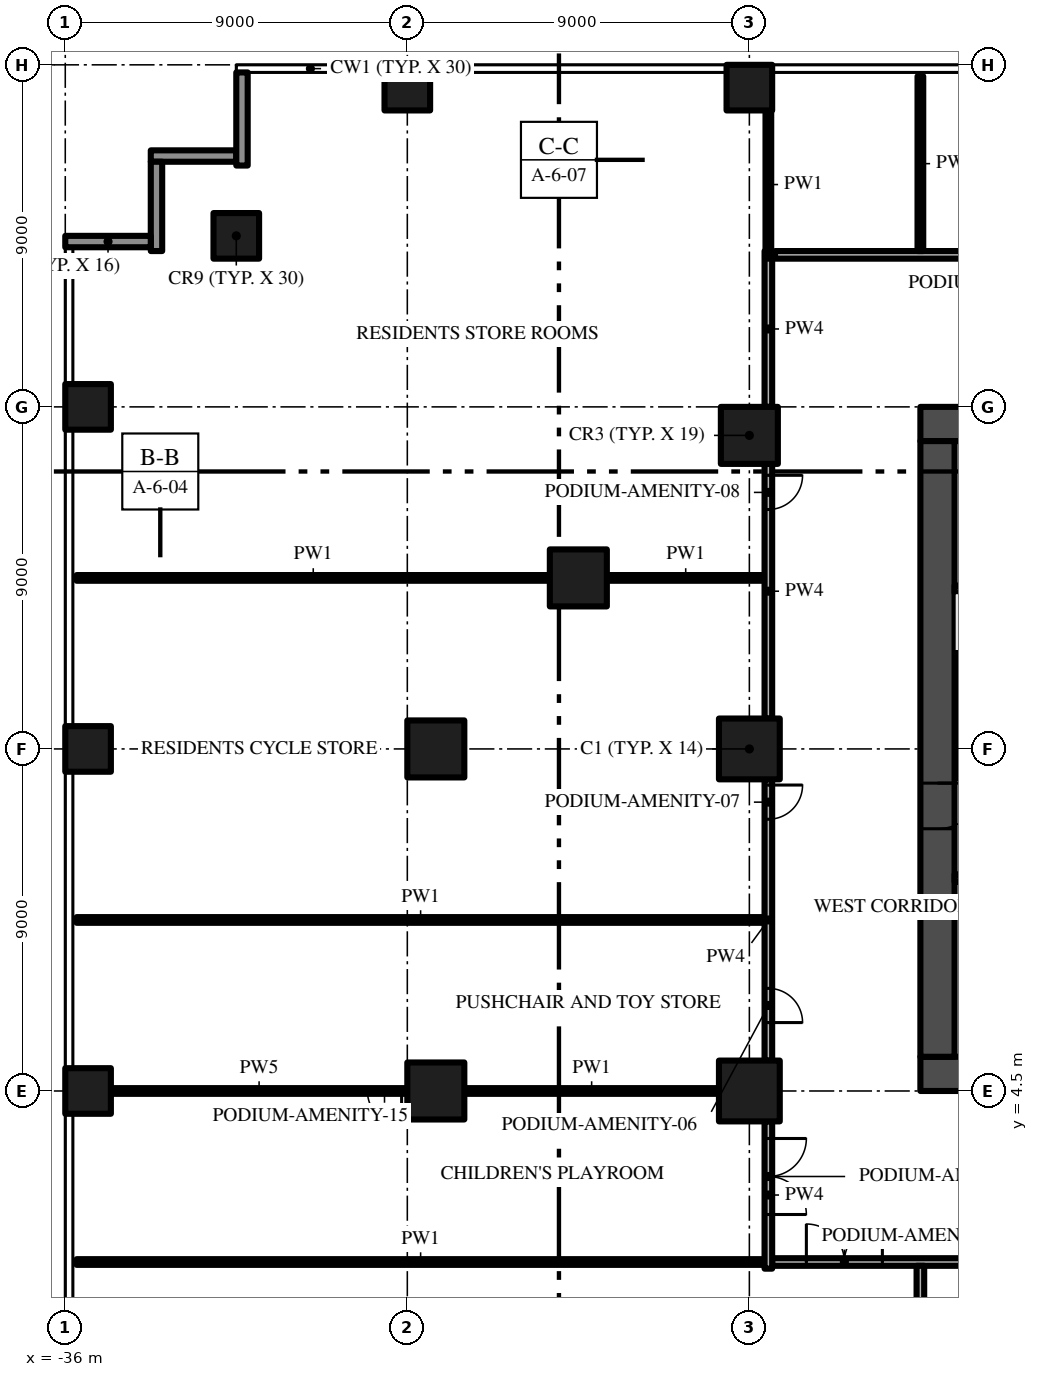
"""IFC4 building model, lengths in metres.
Left out: names, types, materials, properties, quantities, classifications, styles, units other than length and angle.
Written with IfcOpenShell. Run it as: python <this file> out.ifc"""

import sys

from ifc_helpers import new_model, si_unit, direction, frame, frame_2d, origin, origin_2d, place, context, subcontext, project, spatial, rectangle, extrude, element, fill, save


model = new_model("IFC4")
c1 = context("Model", 3, precision=1e-05, world=origin(), true_north=direction((0.0, 1.0)))
c2 = subcontext(c1, "Body", "Model", "MODEL_VIEW")
j1 = project(units=[si_unit("LENGTHUNIT", "METRE"), si_unit("PLANEANGLEUNIT", "RADIAN")], contexts=[c1])
p1 = place(None, origin())
s1 = spatial("IfcSite", under=j1, at=p1, CompositionType="ELEMENT")
p2 = place(p1, origin())
s2 = spatial("IfcBuilding", under=s1, at=p2, CompositionType="ELEMENT")
p3 = place(p2, frame((0.0, 0.0, 6.0)))
s3 = spatial("IfcBuildingStorey", under=s2, at=p3, CompositionType="ELEMENT", Elevation=6.0)
p4 = place(p3, frame((-13.5, 4.95, -0.4), z_axis=(0.0, 0.0, 1.0), x_axis=(1.0, 0.0, 0.0)))
e1 = element("IfcWall", 1, at=p4, inside=s3, PredefinedType="SHEAR", context=c2, shape_type="SweptSolid", body=[
    extrude(rectangle(XDim=27.0, YDim=0.9, at=frame_2d((13.5, 0.0))), origin(), (0.0, 0.0, 1.0), 4.55),
])
p5 = place(p4, frame((12.0, 0.0, 0.4)))
e2 = element("IfcOpeningElement", 2, at=p5, cuts=e1, PredefinedType="OPENING", context=c2, shape_type="SweptSolid", body=[
    extrude(rectangle(XDim=3.0, YDim=2.4, at=frame_2d((1.5, 1.2))), frame((0.0, 0.46, 0.0), z_axis=(0.0, -1.0, 0.0), x_axis=(1.0, 0.0, 0.0)), (0.0, 0.0, 1.0), 0.92),
])
p6 = place(p4, frame((4.9, 0.0, 0.4)))
e3 = element("IfcOpeningElement", 3, at=p6, cuts=e1, PredefinedType="OPENING", context=c2, shape_type="SweptSolid", body=[
    extrude(rectangle(XDim=1.2, YDim=2.2, at=frame_2d((0.6, 1.1))), frame((0.0, 0.46, 0.0), z_axis=(0.0, -1.0, 0.0), x_axis=(1.0, 0.0, 0.0)), (0.0, 0.0, 1.0), 0.92),
])
p7 = place(p4, frame((20.75, 0.0, 0.4)))
e4 = element("IfcOpeningElement", 4, at=p7, cuts=e1, PredefinedType="OPENING", context=c2, shape_type="SweptSolid", body=[
    extrude(rectangle(XDim=1.5, YDim=2.2, at=frame_2d((0.75, 1.1))), frame((0.0, 0.46, 0.0), z_axis=(0.0, -1.0, 0.0), x_axis=(1.0, 0.0, 0.0)), (0.0, 0.0, 1.0), 0.92),
])
p8 = place(p4, frame((17.4, 0.0, 0.4)))
e5 = element("IfcOpeningElement", 5, at=p8, cuts=e1, PredefinedType="OPENING", context=c2, shape_type="SweptSolid", body=[
    extrude(rectangle(XDim=1.2, YDim=2.2, at=frame_2d((0.6, 1.1))), frame((0.0, 0.46, 0.0), z_axis=(0.0, -1.0, 0.0), x_axis=(1.0, 0.0, 0.0)), (0.0, 0.0, 1.0), 0.92),
])
p9 = place(p3, frame((13.5, 22.05, -0.4), z_axis=(0.0, 0.0, 1.0), x_axis=(-1.0, 0.0, 0.0)))
e6 = element("IfcWall", 6, at=p9, inside=s3, PredefinedType="SHEAR", context=c2, shape_type="SweptSolid", body=[
    extrude(rectangle(XDim=27.0, YDim=0.9, at=frame_2d((13.5, 0.0))), origin(), (0.0, 0.0, 1.0), 4.55),
])
p10 = place(p3, frame((-13.05, 21.6, -0.4), z_axis=(0.0, 0.0, 1.0), x_axis=(0.0, -1.0, 0.0)))
e7 = element("IfcWall", 7, at=p10, inside=s3, PredefinedType="SHEAR", context=c2, shape_type="SweptSolid", body=[
    extrude(rectangle(XDim=16.2, YDim=0.9, at=frame_2d((8.1, 0.0))), origin(), (0.0, 0.0, 1.0), 4.55),
])
p11 = place(p10, frame((9.0, 0.0, 0.4)))
e8 = element("IfcOpeningElement", 8, at=p11, cuts=e7, PredefinedType="OPENING", context=c2, shape_type="SweptSolid", body=[
    extrude(rectangle(XDim=1.2, YDim=2.2, at=frame_2d((0.6, 1.1))), frame((0.0, 0.46, 0.0), z_axis=(0.0, -1.0, 0.0), x_axis=(1.0, 0.0, 0.0)), (0.0, 0.0, 1.0), 0.92),
])
for number, where, z_axis, x_axis in (
    (9, (-18.0, 30.9, 0.0), (0.0, 0.0, 1.0), (1.0, 0.0, 0.0)),
    (10, (-27.0, 30.9, 0.0), (0.0, 0.0, 1.0), (1.0, 0.0, 0.0)),
    (11, (-35.4, 13.5, 0.0), (0.0, 0.0, 1.0), (1.0, 0.0, 0.0)),
    (12, (-35.4, 22.5, 0.0), (0.0, 0.0, 1.0), (1.0, 0.0, 0.0)),
    (13, (-31.5, 27.0, 0.0), (0.0, 0.0, 1.0), (1.0, 0.0, 0.0)),
    (14, (-35.4, 4.5, 0.0), (0.0, 0.0, 1.0), (1.0, 0.0, 0.0)),
):
    element("IfcColumn", number, at=place(p3, frame(where, z_axis=z_axis, x_axis=x_axis)), inside=s3, PredefinedType="COLUMN", context=c2, shape_type="SweptSolid", body=[
        extrude(rectangle(XDim=1.2, YDim=1.2, at=origin_2d()), origin(), (0.0, 0.0, 1.0), 4.15),
    ])
p12 = place(p3, frame((-18.0, 13.5, 0.0), z_axis=(0.0, 0.0, 1.0), x_axis=(1.0, 0.0, 0.0)))
e15 = element("IfcColumn", 15, at=p12, inside=s3, PredefinedType="COLUMN", context=c2, shape_type="SweptSolid", body=[
    extrude(rectangle(XDim=1.6, YDim=1.6, at=origin_2d()), origin(), (0.0, 0.0, 1.0), 4.15),
])
p13 = place(p3, frame((-18.0, 21.75, 0.0), z_axis=(0.0, 0.0, 1.0), x_axis=(1.0, 0.0, 0.0)))
e16 = element("IfcColumn", 16, at=p13, inside=s3, PredefinedType="COLUMN", context=c2, shape_type="SweptSolid", body=[
    extrude(rectangle(XDim=1.5, YDim=1.5, at=origin_2d()), origin(), (0.0, 0.0, 1.0), 4.15),
])
p14 = place(p3, frame((-18.0, 4.5, 0.0), z_axis=(0.0, 0.0, 1.0), x_axis=(1.0, 0.0, 0.0)))
e17 = element("IfcColumn", 17, at=p14, inside=s3, PredefinedType="COLUMN", context=c2, shape_type="SweptSolid", body=[
    extrude(rectangle(XDim=1.6, YDim=1.6, at=origin_2d()), origin(), (0.0, 0.0, 1.0), 4.15),
])
for number, where, z_axis, x_axis in (
    (18, (-26.25, 13.5, 0.0), (0.0, 0.0, 1.0), (1.0, 0.0, 0.0)),
    (19, (-22.5, 18.0, 0.0), (0.0, 0.0, 1.0), (1.0, 0.0, 0.0)),
    (20, (-26.25, 4.5, 0.0), (0.0, 0.0, 1.0), (1.0, 0.0, 0.0)),
):
    element("IfcColumn", number, at=place(p3, frame(where, z_axis=z_axis, x_axis=x_axis)), inside=s3, PredefinedType="COLUMN", context=c2, shape_type="SweptSolid", body=[
        extrude(rectangle(XDim=1.5, YDim=1.5, at=origin_2d()), origin(), (0.0, 0.0, 1.0), 4.15),
    ])
p15 = place(p3, frame((-31.35, 28.85, 0.0), z_axis=(0.0, 0.0, 1.0), x_axis=(0.0, 1.0, 0.0)))
e21 = element("IfcWall", 21, at=p15, inside=s3, PredefinedType="SOLIDWALL", context=c2, shape_type="SweptSolid", body=[
    extrude(rectangle(XDim=2.45, YDim=0.3, at=frame_2d((1.225, 0.0))), origin(), (0.0, 0.0, 1.0), 4.15),
])
p16 = place(p3, frame((-33.75, 29.1, 0.0), z_axis=(0.0, 0.0, 1.0), x_axis=(1.0, 0.0, 0.0)))
e22 = element("IfcWall", 22, at=p16, inside=s3, PredefinedType="SOLIDWALL", context=c2, shape_type="SweptSolid", body=[
    extrude(rectangle(XDim=2.25, YDim=0.3, at=frame_2d((1.125, 0.0))), origin(), (0.0, 0.0, 1.0), 4.15),
])
p17 = place(p3, frame((-33.6, 26.6, 0.0), z_axis=(0.0, 0.0, 1.0), x_axis=(0.0, 1.0, 0.0)))
e23 = element("IfcWall", 23, at=p17, inside=s3, PredefinedType="SOLIDWALL", context=c2, shape_type="SweptSolid", body=[
    extrude(rectangle(XDim=2.35, YDim=0.3, at=frame_2d((1.175, 0.0))), origin(), (0.0, 0.0, 1.0), 4.15),
])
p18 = place(p3, frame((-36.0, 26.85, 0.0), z_axis=(0.0, 0.0, 1.0), x_axis=(1.0, 0.0, 0.0)))
e24 = element("IfcWall", 24, at=p18, inside=s3, PredefinedType="SOLIDWALL", context=c2, shape_type="SweptSolid", body=[
    extrude(rectangle(XDim=2.25, YDim=0.3, at=frame_2d((1.125, 0.0))), origin(), (0.0, 0.0, 1.0), 4.15),
])
for number, where, z_axis, x_axis in (
    (25, (-12.6, 10.1, 0.0), (0.0, 0.0, 1.0), (1.0, 0.0, 0.0)),
    (26, (-12.6, 17.7, 0.0), (0.0, 0.0, 1.0), (1.0, 0.0, 0.0)),
):
    element("IfcWall", number, at=place(p3, frame(where, z_axis=z_axis, x_axis=x_axis)), inside=s3, PredefinedType="SHEAR", context=c2, shape_type="SweptSolid", body=[
        extrude(rectangle(XDim=2.95, YDim=0.2, at=frame_2d((1.475, 0.0))), origin(), (0.0, 0.0, 1.0), 4.15),
    ])
p19 = place(p3, frame((-17.4, 0.0, 0.0), z_axis=(0.0, 0.0, 1.0), x_axis=(1.0, 0.0, 0.0)))
e27 = element("IfcWall", 27, at=p19, inside=s3, PredefinedType="PARTITIONING", context=c2, shape_type="SweptSolid", body=[
    extrude(rectangle(XDim=34.8, YDim=0.2, at=frame_2d((17.4, 0.0))), origin(), (0.0, 0.0, 1.0), 4.15),
])
p20 = place(p19, frame((0.9, 0.0, 0.0)))
e28 = element("IfcOpeningElement", 28, at=p20, cuts=e27, PredefinedType="OPENING", context=c2, shape_type="SweptSolid", body=[
    extrude(rectangle(XDim=2.0, YDim=2.4, at=frame_2d((1.0, 1.2))), frame((0.0, 0.11, 0.0), z_axis=(0.0, -1.0, 0.0), x_axis=(1.0, 0.0, 0.0)), (0.0, 0.0, 1.0), 0.22),
])
p21 = place(p19, frame((16.4, 0.0, 0.0)))
e29 = element("IfcOpeningElement", 29, at=p21, cuts=e27, PredefinedType="OPENING", context=c2, shape_type="SweptSolid", body=[
    extrude(rectangle(XDim=2.0, YDim=2.4, at=frame_2d((1.0, 1.2))), frame((0.0, 0.11, 0.0), z_axis=(0.0, -1.0, 0.0), x_axis=(1.0, 0.0, 0.0)), (0.0, 0.0, 1.0), 0.22),
])
p22 = place(p19, frame((32.0, 0.0, 0.0)))
e30 = element("IfcOpeningElement", 30, at=p22, cuts=e27, PredefinedType="OPENING", context=c2, shape_type="SweptSolid", body=[
    extrude(rectangle(XDim=1.8, YDim=2.4, at=frame_2d((0.9, 1.2))), frame((0.0, 0.11, 0.0), z_axis=(0.0, -1.0, 0.0), x_axis=(1.0, 0.0, 0.0)), (0.0, 0.0, 1.0), 0.22),
])
p23 = place(p3, frame((-35.7, 0.0, 0.0), z_axis=(0.0, 0.0, 1.0), x_axis=(1.0, 0.0, 0.0)))
e31 = element("IfcWall", 31, at=p23, inside=s3, PredefinedType="PARTITIONING", context=c2, shape_type="SweptSolid", body=[
    extrude(rectangle(XDim=18.1, YDim=0.15, at=frame_2d((9.05, 0.0))), origin(), (0.0, 0.0, 1.0), 4.15),
])
p24 = place(p3, frame((-27.0, 4.5, 0.0), z_axis=(0.0, 0.0, 1.0), x_axis=(-1.0, 0.0, 0.0)))
e32 = element("IfcWall", 32, at=p24, inside=s3, PredefinedType="PARTITIONING", context=c2, shape_type="SweptSolid", body=[
    extrude(rectangle(XDim=7.8, YDim=0.15, at=frame_2d((3.9, 0.0))), origin(), (0.0, 0.0, 1.0), 4.15),
])
p25 = place(p24, frame((0.15, 0.0, 0.0)))
e33 = element("IfcOpeningElement", 33, at=p25, cuts=e32, PredefinedType="OPENING", context=c2, shape_type="SweptSolid", body=[
    extrude(rectangle(XDim=0.9, YDim=2.1, at=frame_2d((0.45, 1.05))), frame((0.0, 0.085, 0.0), z_axis=(0.0, -1.0, 0.0), x_axis=(1.0, 0.0, 0.0)), (0.0, 0.0, 1.0), 0.17),
])
p26 = place(p3, frame((-25.5, 4.5, 0.0), z_axis=(0.0, 0.0, 1.0), x_axis=(1.0, 0.0, 0.0)))
e34 = element("IfcWall", 34, at=p26, inside=s3, PredefinedType="PARTITIONING", context=c2, shape_type="SweptSolid", body=[
    extrude(rectangle(XDim=6.7, YDim=0.15, at=frame_2d((3.35, 0.0))), origin(), (0.0, 0.0, 1.0), 4.15),
])
p27 = place(p3, frame((-35.7, 9.0, 0.0), z_axis=(0.0, 0.0, 1.0), x_axis=(1.0, 0.0, 0.0)))
e35 = element("IfcWall", 35, at=p27, inside=s3, PredefinedType="PARTITIONING", context=c2, shape_type="SweptSolid", body=[
    extrude(rectangle(XDim=18.1, YDim=0.15, at=frame_2d((9.05, 0.0))), origin(), (0.0, 0.0, 1.0), 4.15),
])
p28 = place(p3, frame((-35.7, 18.0, 0.0), z_axis=(0.0, 0.0, 1.0), x_axis=(1.0, 0.0, 0.0)))
e36 = element("IfcWall", 36, at=p28, inside=s3, PredefinedType="PARTITIONING", context=c2, shape_type="SweptSolid", body=[
    extrude(rectangle(XDim=12.45, YDim=0.15, at=frame_2d((6.225, 0.0))), origin(), (0.0, 0.0, 1.0), 4.15),
])
p29 = place(p3, frame((-21.75, 18.0, 0.0), z_axis=(0.0, 0.0, 1.0), x_axis=(1.0, 0.0, 0.0)))
e37 = element("IfcWall", 37, at=p29, inside=s3, PredefinedType="PARTITIONING", context=c2, shape_type="SweptSolid", body=[
    extrude(rectangle(XDim=4.15, YDim=0.15, at=frame_2d((2.075, 0.0))), origin(), (0.0, 0.0, 1.0), 4.15),
])
p30 = place(p3, frame((-17.325, 26.5, 0.0), z_axis=(0.0, 0.0, 1.0), x_axis=(1.0, 0.0, 0.0)))
e38 = element("IfcWall", 38, at=p30, inside=s3, PredefinedType="PARTITIONING", context=c2, shape_type="SweptSolid", body=[
    extrude(rectangle(XDim=34.65, YDim=0.2, at=frame_2d((17.325, 0.0))), origin(), (0.0, 0.0, 1.0), 4.15),
])
p31 = place(p30, frame((5.625, 0.0, 0.0)))
e39 = element("IfcOpeningElement", 39, at=p31, cuts=e38, PredefinedType="OPENING", context=c2, shape_type="SweptSolid", body=[
    extrude(rectangle(XDim=0.9, YDim=2.1, at=frame_2d((0.45, 1.05))), frame((0.0, 0.11, 0.0), z_axis=(0.0, -1.0, 0.0), x_axis=(1.0, 0.0, 0.0)), (0.0, 0.0, 1.0), 0.22),
])
p32 = place(p30, frame((10.125, 0.0, 0.0)))
e40 = element("IfcOpeningElement", 40, at=p32, cuts=e38, PredefinedType="OPENING", context=c2, shape_type="SweptSolid", body=[
    extrude(rectangle(XDim=0.9, YDim=2.1, at=frame_2d((0.45, 1.05))), frame((0.0, 0.11, 0.0), z_axis=(0.0, -1.0, 0.0), x_axis=(1.0, 0.0, 0.0)), (0.0, 0.0, 1.0), 0.22),
])
p33 = place(p30, frame((14.625, 0.0, 0.0)))
e41 = element("IfcOpeningElement", 41, at=p33, cuts=e38, PredefinedType="OPENING", context=c2, shape_type="SweptSolid", body=[
    extrude(rectangle(XDim=0.9, YDim=2.1, at=frame_2d((0.45, 1.05))), frame((0.0, 0.11, 0.0), z_axis=(0.0, -1.0, 0.0), x_axis=(1.0, 0.0, 0.0)), (0.0, 0.0, 1.0), 0.22),
])
p34 = place(p30, frame((23.625, 0.0, 0.0)))
e42 = element("IfcOpeningElement", 42, at=p34, cuts=e38, PredefinedType="OPENING", context=c2, shape_type="SweptSolid", body=[
    extrude(rectangle(XDim=0.9, YDim=2.1, at=frame_2d((0.45, 1.05))), frame((0.0, 0.11, 0.0), z_axis=(0.0, -1.0, 0.0), x_axis=(1.0, 0.0, 0.0)), (0.0, 0.0, 1.0), 0.22),
])
p35 = place(p3, frame((-17.5, 3.7, 0.0), z_axis=(0.0, 0.0, 1.0), x_axis=(0.0, -1.0, 0.0)))
e43 = element("IfcWall", 43, at=p35, inside=s3, PredefinedType="PARTITIONING", context=c2, shape_type="SweptSolid", body=[
    extrude(rectangle(XDim=3.875, YDim=0.2, at=frame_2d((1.938, 0.0))), origin(), (0.0, 0.0, 1.0), 4.15),
])
p36 = place(p35, frame((0.45, 0.0, 0.0)))
e44 = element("IfcOpeningElement", 44, at=p36, cuts=e43, PredefinedType="OPENING", context=c2, shape_type="SweptSolid", body=[
    extrude(rectangle(XDim=2.0, YDim=2.4, at=frame_2d((1.0, 1.2))), frame((0.0, 0.11, 0.0), z_axis=(0.0, -1.0, 0.0), x_axis=(1.0, 0.0, 0.0)), (0.0, 0.0, 1.0), 0.22),
])
p37 = place(p3, frame((-17.5, 12.7, 0.0), z_axis=(0.0, 0.0, 1.0), x_axis=(0.0, -1.0, 0.0)))
e45 = element("IfcWall", 45, at=p37, inside=s3, PredefinedType="PARTITIONING", context=c2, shape_type="SweptSolid", body=[
    extrude(rectangle(XDim=7.4, YDim=0.2, at=frame_2d((3.7, 0.0))), origin(), (0.0, 0.0, 1.0), 4.15),
])
p38 = place(p37, frame((5.5, 0.0, 0.0)))
e46 = element("IfcOpeningElement", 46, at=p38, cuts=e45, PredefinedType="OPENING", context=c2, shape_type="SweptSolid", body=[
    extrude(rectangle(XDim=0.9, YDim=2.1, at=frame_2d((0.45, 1.05))), frame((0.0, 0.11, 0.0), z_axis=(0.0, -1.0, 0.0), x_axis=(1.0, 0.0, 0.0)), (0.0, 0.0, 1.0), 0.22),
])
p39 = place(p37, frame((0.15, 0.0, 0.0)))
e47 = element("IfcOpeningElement", 47, at=p39, cuts=e45, PredefinedType="OPENING", context=c2, shape_type="SweptSolid", body=[
    extrude(rectangle(XDim=0.9, YDim=2.1, at=frame_2d((0.45, 1.05))), frame((0.0, 0.11, 0.0), z_axis=(0.0, -1.0, 0.0), x_axis=(1.0, 0.0, 0.0)), (0.0, 0.0, 1.0), 0.22),
])
p40 = place(p3, frame((-17.5, 21.0, 0.0), z_axis=(0.0, 0.0, 1.0), x_axis=(0.0, -1.0, 0.0)))
e48 = element("IfcWall", 48, at=p40, inside=s3, PredefinedType="PARTITIONING", context=c2, shape_type="SweptSolid", body=[
    extrude(rectangle(XDim=6.7, YDim=0.2, at=frame_2d((3.35, 0.0))), origin(), (0.0, 0.0, 1.0), 4.15),
])
p41 = place(p40, frame((0.3, 0.0, 0.0)))
e49 = element("IfcOpeningElement", 49, at=p41, cuts=e48, PredefinedType="OPENING", context=c2, shape_type="SweptSolid", body=[
    extrude(rectangle(XDim=0.9, YDim=2.1, at=frame_2d((0.45, 1.05))), frame((0.0, 0.11, 0.0), z_axis=(0.0, -1.0, 0.0), x_axis=(1.0, 0.0, 0.0)), (0.0, 0.0, 1.0), 0.22),
])
p42 = place(p3, frame((-17.5, 22.5, 0.0), z_axis=(0.0, 0.0, 1.0), x_axis=(0.0, 1.0, 0.0)))
e50 = element("IfcWall", 50, at=p42, inside=s3, PredefinedType="PARTITIONING", context=c2, shape_type="SweptSolid", body=[
    extrude(rectangle(XDim=4.1, YDim=0.2, at=frame_2d((2.05, 0.0))), origin(), (0.0, 0.0, 1.0), 4.15),
])
p43 = place(p3, frame((-17.5, 26.4, 0.0), z_axis=(0.0, 0.0, 1.0), x_axis=(0.0, 1.0, 0.0)))
e51 = element("IfcWall", 51, at=p43, inside=s3, PredefinedType="PARTITIONING", context=c2, shape_type="SweptSolid", body=[
    extrude(rectangle(XDim=3.9, YDim=0.15, at=frame_2d((1.95, 0.0))), origin(), (0.0, 0.0, 1.0), 4.15),
])
p44 = place(p3, frame((-13.5, 26.6, 0.0), z_axis=(0.0, 0.0, 1.0), x_axis=(0.0, 1.0, 0.0)))
e52 = element("IfcWall", 52, at=p44, inside=s3, PredefinedType="PARTITIONING", context=c2, shape_type="SweptSolid", body=[
    extrude(rectangle(XDim=4.6, YDim=0.15, at=frame_2d((2.3, 0.0))), origin(), (0.0, 0.0, 1.0), 4.15),
])
p45 = place(p3, frame((-13.5, -31.2, 0.0), z_axis=(0.0, 0.0, 1.0), x_axis=(0.0, 1.0, 0.0)))
e53 = element("IfcWall", 53, at=p45, inside=s3, PredefinedType="PARTITIONING", context=c2, shape_type="SweptSolid", body=[
    extrude(rectangle(XDim=31.1, YDim=0.2, at=frame_2d((15.55, 0.0))), origin(), (0.0, 0.0, 1.0), 4.15),
])
p46 = place(p11, frame((1.2, 0.0, 0.0), z_axis=(0.0, 0.0, 1.0), x_axis=(-1.0, 0.0, 0.0)))
e54 = element("IfcDoor", 54, at=p46, inside=s3, OperationType="SINGLE_SWING_RIGHT", PredefinedType="DOOR", context=c2, shape_type="SweptSolid", body=[
    extrude(rectangle(XDim=1.2, YDim=2.2, at=frame_2d((0.6, 1.1))), frame((0.0, 0.025, 0.0), z_axis=(0.0, -1.0, 0.0), x_axis=(1.0, 0.0, 0.0)), (0.0, 0.0, 1.0), 0.05),
])
fill(e8, e54)
p47 = place(p36, origin())
e55 = element("IfcDoor", 55, at=p47, inside=s3, OperationType="DOUBLE_DOOR_SINGLE_SWING", PredefinedType="DOOR", context=c2, shape_type="SweptSolid", body=[
    extrude(rectangle(XDim=2.0, YDim=2.4, at=frame_2d((1.0, 1.2))), frame((0.0, 0.025, 0.0), z_axis=(0.0, -1.0, 0.0), x_axis=(1.0, 0.0, 0.0)), (0.0, 0.0, 1.0), 0.05),
])
fill(e44, e55)
p48 = place(p20, origin())
e56 = element("IfcDoor", 56, at=p48, inside=s3, OperationType="DOUBLE_DOOR_SINGLE_SWING", PredefinedType="DOOR", context=c2, shape_type="SweptSolid", body=[
    extrude(rectangle(XDim=2.0, YDim=2.4, at=frame_2d((1.0, 1.2))), frame((0.0, 0.025, 0.0), z_axis=(0.0, -1.0, 0.0), x_axis=(1.0, 0.0, 0.0)), (0.0, 0.0, 1.0), 0.05),
])
fill(e28, e56)
p49 = place(p38, origin())
e57 = element("IfcDoor", 57, at=p49, inside=s3, OperationType="SINGLE_SWING_RIGHT", PredefinedType="DOOR", context=c2, shape_type="SweptSolid", body=[
    extrude(rectangle(XDim=0.9, YDim=2.1, at=frame_2d((0.45, 1.05))), frame((0.0, 0.025, 0.0), z_axis=(0.0, -1.0, 0.0), x_axis=(1.0, 0.0, 0.0)), (0.0, 0.0, 1.0), 0.05),
])
fill(e46, e57)
p50 = place(p39, origin())
e58 = element("IfcDoor", 58, at=p50, inside=s3, OperationType="SINGLE_SWING_LEFT", PredefinedType="DOOR", context=c2, shape_type="SweptSolid", body=[
    extrude(rectangle(XDim=0.9, YDim=2.1, at=frame_2d((0.45, 1.05))), frame((0.0, 0.025, 0.0), z_axis=(0.0, -1.0, 0.0), x_axis=(1.0, 0.0, 0.0)), (0.0, 0.0, 1.0), 0.05),
])
fill(e47, e58)
p51 = place(p41, origin())
e59 = element("IfcDoor", 59, at=p51, inside=s3, OperationType="SINGLE_SWING_LEFT", PredefinedType="DOOR", context=c2, shape_type="SweptSolid", body=[
    extrude(rectangle(XDim=0.9, YDim=2.1, at=frame_2d((0.45, 1.05))), frame((0.0, 0.025, 0.0), z_axis=(0.0, -1.0, 0.0), x_axis=(1.0, 0.0, 0.0)), (0.0, 0.0, 1.0), 0.05),
])
fill(e49, e59)
p52 = place(p25, origin())
e60 = element("IfcDoor", 60, at=p52, inside=s3, OperationType="SINGLE_SWING_LEFT", PredefinedType="DOOR", context=c2, shape_type="SweptSolid", body=[
    extrude(rectangle(XDim=0.9, YDim=2.1, at=frame_2d((0.45, 1.05))), frame((0.0, 0.025, 0.0), z_axis=(0.0, -1.0, 0.0), x_axis=(1.0, 0.0, 0.0)), (0.0, 0.0, 1.0), 0.05),
])
fill(e33, e60)
save(model, sys.argv[1])
